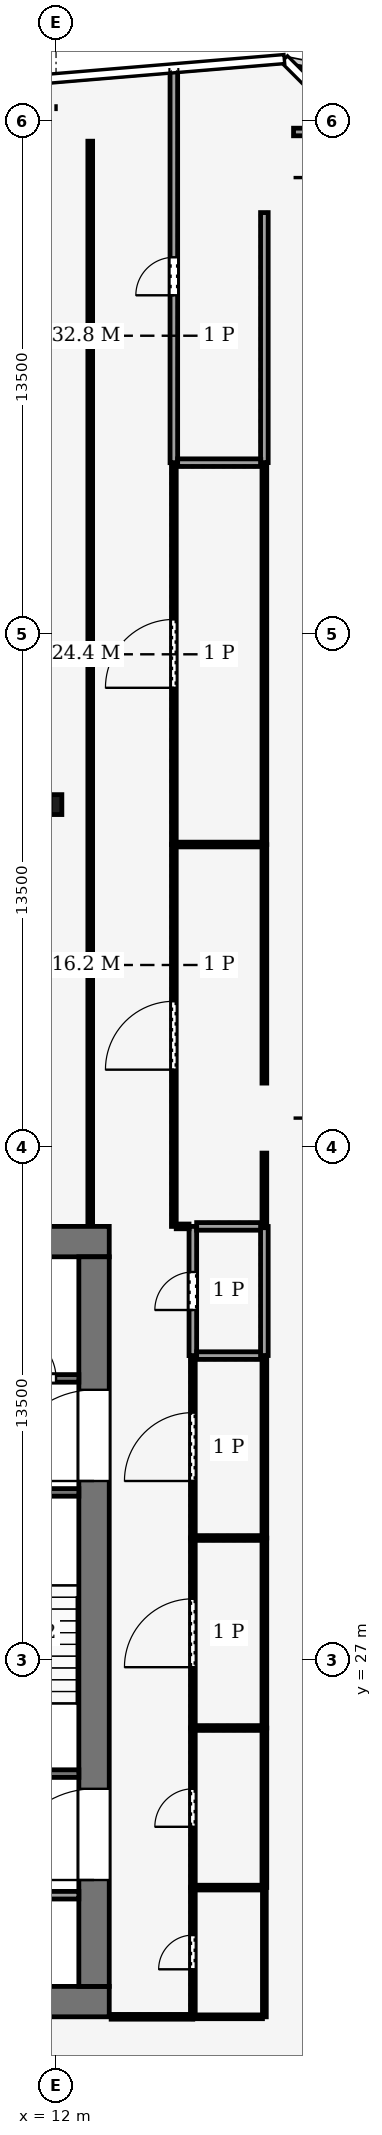
"""IFC4 building model, lengths in metres.
Left out: names, types, materials, properties, quantities, classifications, styles, units other than length and angle.
Written with IfcOpenShell. Run it as: python <this file> out.ifc"""

import sys

from ifc_helpers import new_model, si_unit, direction, frame, frame_2d, origin, origin_2d, place, context, subcontext, project, spatial, rectangle, hollow_rectangle, i_section, extrude, element, fill, save


model = new_model("IFC4")
c1 = context("Model", 3, precision=1e-05, world=origin(), true_north=direction((0.0, 1.0)))
c2 = subcontext(c1, "Body", "Model", "MODEL_VIEW")
j1 = project(units=[si_unit("LENGTHUNIT", "METRE"), si_unit("PLANEANGLEUNIT", "RADIAN")], contexts=[c1])
p1 = place(None, origin())
s1 = spatial("IfcSite", under=j1, at=p1, CompositionType="ELEMENT")
p2 = place(p1, origin())
s2 = spatial("IfcBuilding", under=s1, at=p2, CompositionType="ELEMENT")
p3 = place(p2, frame((0.0, 0.0, 282.0)))
s3 = spatial("IfcBuildingStorey", under=s2, at=p3, CompositionType="ELEMENT", Elevation=282.0)
for number, where, z_axis, x_axis in (
    (1, (-13.4, 18.0, -0.25), (0.0, 0.0, 1.0), (1.0, 0.0, 0.0)),
    (2, (-13.4, 38.0, -0.25), (0.0, 0.0, 1.0), (1.0, 0.0, 0.0)),
):
    element("IfcWall", number, at=place(p3, frame(where, z_axis=z_axis, x_axis=x_axis)), inside=s3, PredefinedType="SHEAR", context=c2, shape_type="SweptSolid", body=[
        extrude(rectangle(XDim=26.8, YDim=0.8, at=frame_2d((13.4, 0.0))), origin(), (0.0, 0.0, 1.0), 7.12),
    ])
p4 = place(p3, frame((13.0, 18.4, -0.25), z_axis=(0.0, 0.0, 1.0), x_axis=(0.0, 1.0, 0.0)))
e3 = element("IfcWall", 3, at=p4, inside=s3, PredefinedType="SHEAR", context=c2, shape_type="SweptSolid", body=[
    extrude(rectangle(XDim=19.2, YDim=0.8, at=frame_2d((9.6, 0.0))), origin(), (0.0, 0.0, 1.0), 7.12),
])
p5 = place(p4, frame((2.8, 0.0, 0.25)))
e4 = element("IfcOpeningElement", 4, at=p5, cuts=e3, PredefinedType="OPENING", context=c2, shape_type="SweptSolid", body=[
    extrude(rectangle(XDim=2.4, YDim=2.4, at=frame_2d((1.2, 1.2))), frame((0.0, 0.41, 0.0), z_axis=(0.0, -1.0, 0.0), x_axis=(1.0, 0.0, 0.0)), (0.0, 0.0, 1.0), 0.82),
])
p6 = place(p4, frame((13.3, 0.0, 0.25)))
e5 = element("IfcOpeningElement", 5, at=p6, cuts=e3, PredefinedType="OPENING", context=c2, shape_type="SweptSolid", body=[
    extrude(rectangle(XDim=2.4, YDim=2.4, at=frame_2d((1.2, 1.2))), frame((0.0, 0.41, 0.0), z_axis=(0.0, -1.0, 0.0), x_axis=(1.0, 0.0, 0.0)), (0.0, 0.0, 1.0), 0.82),
])
for number, where, z_axis, x_axis in (
    (6, (21.0, 66.0, 0.223), (-0.387, 0.0, 0.922), (0.0, -1.0, 0.0)),
    (7, (21.0, 41.25, 0.223), (-0.387, 0.0, 0.922), (0.0, -1.0, 0.0)),
):
    element("IfcColumn", number, at=place(p3, frame(where, z_axis=z_axis, x_axis=x_axis)), inside=s3, PredefinedType="COLUMN", context=c2, shape_type="SweptSolid", body=[
        extrude(hollow_rectangle(XDim=1.0, YDim=1.0, WallThickness=0.045, at=origin_2d()), origin(), (0.0, 0.0, 1.0), 7.108),
    ])
p7 = place(p3, frame((12.0, 67.75, 0.029), z_axis=(0.0, 0.025979412411, 0.999662478105), x_axis=(-1.0, 0.0, 0.0)))
e8 = element("IfcColumn", 8, at=p7, inside=s3, PredefinedType="COLUMN", context=c2, shape_type="SweptSolid", body=[
    extrude(hollow_rectangle(XDim=0.6, YDim=0.6, WallThickness=0.025, at=origin_2d()), origin(), (0.0, 0.0, 1.0), 6.945),
])
p8 = place(p3, frame((12.0, 49.5, 0.0), z_axis=(0.0, 0.0, 1.0), x_axis=(1.0, 0.0, 0.0)))
e9 = element("IfcColumn", 9, at=p8, inside=s3, PredefinedType="COLUMN", context=c2, shape_type="SweptSolid", body=[
    extrude(i_section(OverallWidth=0.306, OverallDepth=0.524, WebThickness=0.012, FlangeThickness=0.04, FilletRadius=0.027, at=origin_2d()), origin(), (0.0, 0.0, 1.0), 7.0),
])
p9 = place(p3, frame((6.0, 20.8, 0.0), z_axis=(0.0, 0.0, 1.0), x_axis=(1.0, 0.0, 0.0)))
e10 = element("IfcWall", 10, at=p9, inside=s3, PredefinedType="PARTITIONING", context=c2, shape_type="SweptSolid", body=[
    extrude(rectangle(XDim=6.6, YDim=0.2, at=frame_2d((3.3, 0.0))), origin(), (0.0, 0.0, 1.0), 6.87),
])
p10 = place(p9, frame((2.8, 0.0, 0.0)))
e11 = element("IfcOpeningElement", 11, at=p10, cuts=e10, PredefinedType="OPENING", context=c2, shape_type="SweptSolid", body=[
    extrude(rectangle(XDim=1.0, YDim=2.1, at=frame_2d((0.5, 1.05))), frame((0.0, 0.11, 0.0), z_axis=(0.0, -1.0, 0.0), x_axis=(1.0, 0.0, 0.0)), (0.0, 0.0, 1.0), 0.22),
])
p11 = place(p3, frame((6.0, 24.0, 0.0), z_axis=(0.0, 0.0, 1.0), x_axis=(1.0, 0.0, 0.0)))
e12 = element("IfcWall", 12, at=p11, inside=s3, PredefinedType="PARTITIONING", context=c2, shape_type="SweptSolid", body=[
    extrude(rectangle(XDim=6.6, YDim=0.2, at=frame_2d((3.3, 0.0))), origin(), (0.0, 0.0, 1.0), 6.87),
])
p12 = place(p11, frame((0.9, 0.0, 0.0)))
e13 = element("IfcOpeningElement", 13, at=p12, cuts=e12, PredefinedType="OPENING", context=c2, shape_type="SweptSolid", body=[
    extrude(rectangle(XDim=1.0, YDim=2.1, at=frame_2d((0.5, 1.05))), frame((0.0, 0.11, 0.0), z_axis=(0.0, -1.0, 0.0), x_axis=(1.0, 0.0, 0.0)), (0.0, 0.0, 1.0), 0.22),
])
p13 = place(p11, frame((4.4, 0.0, 0.0)))
e14 = element("IfcOpeningElement", 14, at=p13, cuts=e12, PredefinedType="OPENING", context=c2, shape_type="SweptSolid", body=[
    extrude(rectangle(XDim=1.2, YDim=2.2, at=frame_2d((0.6, 1.1))), frame((0.0, 0.11, 0.0), z_axis=(0.0, -1.0, 0.0), x_axis=(1.0, 0.0, 0.0)), (0.0, 0.0, 1.0), 0.22),
])
p14 = place(p3, frame((6.0, 31.4, 0.0), z_axis=(0.0, 0.0, 1.0), x_axis=(1.0, 0.0, 0.0)))
e15 = element("IfcWall", 15, at=p14, inside=s3, PredefinedType="PARTITIONING", context=c2, shape_type="SweptSolid", body=[
    extrude(rectangle(XDim=6.6, YDim=0.2, at=frame_2d((3.3, 0.0))), origin(), (0.0, 0.0, 1.0), 6.87),
])
p15 = place(p3, frame((6.0, 34.4, 0.0), z_axis=(0.0, 0.0, 1.0), x_axis=(1.0, 0.0, 0.0)))
e16 = element("IfcWall", 16, at=p15, inside=s3, PredefinedType="PARTITIONING", context=c2, shape_type="SweptSolid", body=[
    extrude(rectangle(XDim=6.6, YDim=0.2, at=frame_2d((3.3, 0.0))), origin(), (0.0, 0.0, 1.0), 6.87),
])
p16 = place(p15, frame((4.8, 0.0, 0.0)))
e17 = element("IfcOpeningElement", 17, at=p16, cuts=e16, PredefinedType="OPENING", context=c2, shape_type="SweptSolid", body=[
    extrude(rectangle(XDim=1.2, YDim=2.2, at=frame_2d((0.6, 1.1))), frame((0.0, 0.11, 0.0), z_axis=(0.0, -1.0, 0.0), x_axis=(1.0, 0.0, 0.0)), (0.0, 0.0, 1.0), 0.22),
])
p17 = place(p3, frame((15.6, 17.6, 0.0), z_axis=(0.0, 0.0, 1.0), x_axis=(0.0, 1.0, 0.0)))
e18 = element("IfcWall", 18, at=p17, inside=s3, PredefinedType="PARTITIONING", context=c2, shape_type="SweptSolid", body=[
    extrude(rectangle(XDim=3.4, YDim=0.125, at=frame_2d((1.7, 0.0))), origin(), (0.0, 0.0, 1.0), 6.14),
])
p18 = place(p17, frame((1.25, 0.0, 0.0)))
e19 = element("IfcOpeningElement", 19, at=p18, cuts=e18, PredefinedType="OPENING", context=c2, shape_type="SweptSolid", body=[
    extrude(rectangle(XDim=0.9, YDim=2.1, at=frame_2d((0.45, 1.05))), frame((0.0, 0.073, 0.0), z_axis=(0.0, -1.0, 0.0), x_axis=(1.0, 0.0, 0.0)), (0.0, 0.0, 1.0), 0.145),
])
p19 = place(p3, frame((15.6, 21.0, 0.0), z_axis=(0.0, 0.0, 1.0), x_axis=(0.0, 1.0, 0.0)))
e20 = element("IfcWall", 20, at=p19, inside=s3, PredefinedType="PARTITIONING", context=c2, shape_type="SweptSolid", body=[
    extrude(rectangle(XDim=4.2, YDim=0.125, at=frame_2d((2.1, 0.0))), origin(), (0.0, 0.0, 1.0), 6.48),
])
p20 = place(p19, frame((1.6, 0.0, 0.0)))
e21 = element("IfcOpeningElement", 21, at=p20, cuts=e20, PredefinedType="OPENING", context=c2, shape_type="SweptSolid", body=[
    extrude(rectangle(XDim=1.0, YDim=2.1, at=frame_2d((0.5, 1.05))), frame((0.0, 0.073, 0.0), z_axis=(0.0, -1.0, 0.0), x_axis=(1.0, 0.0, 0.0)), (0.0, 0.0, 1.0), 0.145),
])
p21 = place(p3, frame((15.6, 25.2, 0.0), z_axis=(0.0, 0.0, 1.0), x_axis=(0.0, 1.0, 0.0)))
e22 = element("IfcWall", 22, at=p21, inside=s3, PredefinedType="PARTITIONING", context=c2, shape_type="SweptSolid", body=[
    extrude(rectangle(XDim=5.0, YDim=0.125, at=frame_2d((2.5, 0.0))), origin(), (0.0, 0.0, 1.0), 6.48),
])
p22 = place(p21, frame((1.6, 0.0, 0.0)))
e23 = element("IfcOpeningElement", 23, at=p22, cuts=e22, PredefinedType="OPENING", context=c2, shape_type="SweptSolid", body=[
    extrude(rectangle(XDim=1.8, YDim=2.4, at=frame_2d((0.9, 1.2))), frame((0.0, 0.073, 0.0), z_axis=(0.0, -1.0, 0.0), x_axis=(1.0, 0.0, 0.0)), (0.0, 0.0, 1.0), 0.145),
])
p23 = place(p3, frame((15.6, 30.2, 0.0), z_axis=(0.0, 0.0, 1.0), x_axis=(0.0, 1.0, 0.0)))
e24 = element("IfcWall", 24, at=p23, inside=s3, PredefinedType="PARTITIONING", context=c2, shape_type="SweptSolid", body=[
    extrude(rectangle(XDim=4.8, YDim=0.125, at=frame_2d((2.4, 0.0))), origin(), (0.0, 0.0, 1.0), 6.48),
])
p24 = place(p23, frame((1.5, 0.0, 0.0)))
e25 = element("IfcOpeningElement", 25, at=p24, cuts=e24, PredefinedType="OPENING", context=c2, shape_type="SweptSolid", body=[
    extrude(rectangle(XDim=1.8, YDim=2.4, at=frame_2d((0.9, 1.2))), frame((0.0, 0.073, 0.0), z_axis=(0.0, -1.0, 0.0), x_axis=(1.0, 0.0, 0.0)), (0.0, 0.0, 1.0), 0.145),
])
p25 = place(p3, frame((15.6, 35.0, 0.0), z_axis=(0.0, 0.0, 1.0), x_axis=(0.0, 1.0, 0.0)))
e26 = element("IfcWall", 26, at=p25, inside=s3, PredefinedType="PARTITIONING", context=c2, shape_type="SweptSolid", body=[
    extrude(rectangle(XDim=3.4, YDim=0.2, at=frame_2d((1.7, 0.0))), origin(), (0.0, 0.0, 1.0), 6.14),
])
p26 = place(p25, frame((1.2, 0.0, 0.0)))
e27 = element("IfcOpeningElement", 27, at=p26, cuts=e26, PredefinedType="OPENING", context=c2, shape_type="SweptSolid", body=[
    extrude(rectangle(XDim=1.0, YDim=2.1, at=frame_2d((0.5, 1.05))), frame((0.0, 0.11, 0.0), z_axis=(0.0, -1.0, 0.0), x_axis=(1.0, 0.0, 0.0)), (0.0, 0.0, 1.0), 0.22),
])
p27 = place(p3, frame((15.1, 38.4, 0.0), z_axis=(0.0, 0.0, 1.0), x_axis=(0.0, 1.0, 0.0)))
e28 = element("IfcWall", 28, at=p27, inside=s3, PredefinedType="PARTITIONING", context=c2, shape_type="SweptSolid", body=[
    extrude(rectangle(XDim=10.049, YDim=0.125, at=frame_2d((5.024, 0.0))), origin(), (0.0, 0.0, 1.0), 6.14),
])
p28 = place(p27, frame((4.125, 0.0, 0.0)))
e29 = element("IfcOpeningElement", 29, at=p28, cuts=e28, PredefinedType="OPENING", context=c2, shape_type="SweptSolid", body=[
    extrude(rectangle(XDim=1.8, YDim=2.4, at=frame_2d((0.9, 1.2))), frame((0.0, 0.073, 0.0), z_axis=(0.0, -1.0, 0.0), x_axis=(1.0, 0.0, 0.0)), (0.0, 0.0, 1.0), 0.145),
])
p29 = place(p3, frame((15.163, 38.4, 0.0), z_axis=(0.0, 0.0, 1.0), x_axis=(1.0, 0.0, 0.0)))
e30 = element("IfcWall", 30, at=p29, inside=s3, PredefinedType="PARTITIONING", context=c2, shape_type="SweptSolid", body=[
    extrude(rectangle(XDim=0.337, YDim=0.125, at=frame_2d((0.169, 0.0))), origin(), (0.0, 0.0, 1.0), 6.14),
])
p30 = place(p3, frame((15.1, 48.449, 0.0), z_axis=(0.0, 0.0, 1.0), x_axis=(0.0, 1.0, 0.0)))
e31 = element("IfcWall", 31, at=p30, inside=s3, PredefinedType="PARTITIONING", context=c2, shape_type="SweptSolid", body=[
    extrude(rectangle(XDim=10.049, YDim=0.125, at=frame_2d((5.024, 0.0))), origin(), (0.0, 0.0, 1.0), 6.35),
])
p31 = place(p30, frame((4.125, 0.0, 0.0)))
e32 = element("IfcOpeningElement", 32, at=p31, cuts=e31, PredefinedType="OPENING", context=c2, shape_type="SweptSolid", body=[
    extrude(rectangle(XDim=1.8, YDim=2.4, at=frame_2d((0.9, 1.2))), frame((0.0, 0.073, 0.0), z_axis=(0.0, -1.0, 0.0), x_axis=(1.0, 0.0, 0.0)), (0.0, 0.0, 1.0), 0.145),
])
p32 = place(p3, frame((15.1, 58.498, 0.0), z_axis=(0.0, 0.0, 1.0), x_axis=(0.0, 1.0, 0.0)))
e33 = element("IfcWall", 33, at=p32, inside=s3, PredefinedType="PARTITIONING", context=c2, shape_type="SweptSolid", body=[
    extrude(rectangle(XDim=10.34, YDim=0.2, at=frame_2d((5.17, 0.0))), origin(), (0.0, 0.0, 1.0), 6.04),
])
p33 = place(p32, frame((4.405, 0.0, 0.0)))
e34 = element("IfcOpeningElement", 34, at=p33, cuts=e33, PredefinedType="OPENING", context=c2, shape_type="SweptSolid", body=[
    extrude(rectangle(XDim=1.0, YDim=2.1, at=frame_2d((0.5, 1.05))), frame((0.0, 0.11, 0.0), z_axis=(0.0, -1.0, 0.0), x_axis=(1.0, 0.0, 0.0)), (0.0, 0.0, 1.0), 0.22),
])
for number, where, z_axis, x_axis in (
    (35, (15.663, 21.0, 0.0), (0.0, 0.0, 1.0), (1.0, 0.0, 0.0)),
    (36, (15.663, 25.2, 0.0), (0.0, 0.0, 1.0), (1.0, 0.0, 0.0)),
    (37, (15.663, 30.2, 0.0), (0.0, 0.0, 1.0), (1.0, 0.0, 0.0)),
):
    element("IfcWall", number, at=place(p3, frame(where, z_axis=z_axis, x_axis=x_axis)), inside=s3, PredefinedType="PARTITIONING", context=c2, shape_type="SweptSolid", body=[
        extrude(rectangle(XDim=1.819, YDim=0.125, at=frame_2d((0.91, 0.0))), origin(), (0.0, 0.0, 1.0), 6.87),
    ])
p34 = place(p3, frame((15.7, 35.0, 0.0), z_axis=(0.0, 0.0, 1.0), x_axis=(1.0, 0.0, 0.0)))
e38 = element("IfcWall", 38, at=p34, inside=s3, PredefinedType="PARTITIONING", context=c2, shape_type="SweptSolid", body=[
    extrude(rectangle(XDim=1.782, YDim=0.2, at=frame_2d((0.891, 0.0))), origin(), (0.0, 0.0, 1.0), 6.87),
])
p35 = place(p3, frame((15.7, 38.4, 0.0), z_axis=(0.0, 0.0, 1.0), x_axis=(1.0, 0.0, 0.0)))
e39 = element("IfcWall", 39, at=p35, inside=s3, PredefinedType="PARTITIONING", context=c2, shape_type="SweptSolid", body=[
    extrude(rectangle(XDim=1.782, YDim=0.2, at=frame_2d((0.891, 0.0))), origin(), (0.0, 0.0, 1.0), 6.14),
])
p36 = place(p3, frame((15.163, 48.449, 0.0), z_axis=(0.0, 0.0, 1.0), x_axis=(1.0, 0.0, 0.0)))
e40 = element("IfcWall", 40, at=p36, inside=s3, PredefinedType="PARTITIONING", context=c2, shape_type="SweptSolid", body=[
    extrude(rectangle(XDim=2.319, YDim=0.125, at=frame_2d((1.16, 0.0))), origin(), (0.0, 0.0, 1.0), 6.39),
])
p37 = place(p3, frame((15.2, 58.498, 0.0), z_axis=(0.0, 0.0, 1.0), x_axis=(1.0, 0.0, 0.0)))
e41 = element("IfcWall", 41, at=p37, inside=s3, PredefinedType="PARTITIONING", context=c2, shape_type="SweptSolid", body=[
    extrude(rectangle(XDim=2.282, YDim=0.2, at=frame_2d((1.141, 0.0))), origin(), (0.0, 0.0, 1.0), 6.24),
])
p38 = place(p3, frame((12.9, 38.45, 0.0), z_axis=(0.0, 0.0, 1.0), x_axis=(0.0, 1.0, 0.0)))
e42 = element("IfcWall", 42, at=p38, inside=s3, PredefinedType="PARTITIONING", context=c2, shape_type="SweptSolid", body=[
    extrude(rectangle(XDim=28.508, YDim=0.125, at=frame_2d((14.254, 0.0))), origin(), (0.0, 0.0, 1.0), 6.35),
])
p39 = place(p3, frame((15.598, 17.6, 0.0), z_axis=(0.0, 0.0, 1.0), x_axis=(-1.0, 0.0, 0.0)))
e43 = element("IfcWall", 43, at=p39, inside=s3, PredefinedType="PARTITIONING", context=c2, shape_type="SweptSolid", body=[
    extrude(rectangle(XDim=2.148, YDim=0.125, at=frame_2d((1.074, 0.0))), origin(), (0.0, 0.0, 1.0), 6.14),
])
p40 = place(p3, frame((17.482, 20.998, 0.0), z_axis=(0.0, 0.0, 1.0), x_axis=(0.0, -1.0, 0.0)))
e44 = element("IfcWall", 44, at=p40, inside=s3, PredefinedType="PARTITIONING", context=c2, shape_type="SweptSolid", body=[
    extrude(rectangle(XDim=3.398, YDim=0.1, at=frame_2d((1.699, 0.0))), origin(), (0.0, 0.0, 1.0), 6.14),
])
p41 = place(p3, frame((17.432, 17.6, 0.0), z_axis=(0.0, 0.0, 1.0), x_axis=(-1.0, 0.0, 0.0)))
e45 = element("IfcWall", 45, at=p41, inside=s3, PredefinedType="PARTITIONING", context=c2, shape_type="SweptSolid", body=[
    extrude(rectangle(XDim=1.83, YDim=0.1, at=frame_2d((0.915, 0.0))), origin(), (0.0, 0.0, 1.0), 6.14),
])
p42 = place(p3, frame((17.482, 25.198, 0.0), z_axis=(0.0, 0.0, 1.0), x_axis=(0.0, -1.0, 0.0)))
e46 = element("IfcWall", 46, at=p42, inside=s3, PredefinedType="PARTITIONING", context=c2, shape_type="SweptSolid", body=[
    extrude(rectangle(XDim=4.196, YDim=0.125, at=frame_2d((2.098, 0.0))), origin(), (0.0, 0.0, 1.0), 6.48),
])
p43 = place(p3, frame((17.482, 30.198, 0.0), z_axis=(0.0, 0.0, 1.0), x_axis=(0.0, -1.0, 0.0)))
e47 = element("IfcWall", 47, at=p43, inside=s3, PredefinedType="PARTITIONING", context=c2, shape_type="SweptSolid", body=[
    extrude(rectangle(XDim=4.996, YDim=0.125, at=frame_2d((2.498, 0.0))), origin(), (0.0, 0.0, 1.0), 6.48),
])
p44 = place(p3, frame((17.482, 34.998, 0.0), z_axis=(0.0, 0.0, 1.0), x_axis=(0.0, -1.0, 0.0)))
e48 = element("IfcWall", 48, at=p44, inside=s3, PredefinedType="PARTITIONING", context=c2, shape_type="SweptSolid", body=[
    extrude(rectangle(XDim=4.796, YDim=0.125, at=frame_2d((2.398, 0.0))), origin(), (0.0, 0.0, 1.0), 6.48),
])
p45 = place(p3, frame((17.482, 38.398, 0.0), z_axis=(0.0, 0.0, 1.0), x_axis=(0.0, -1.0, 0.0)))
e49 = element("IfcWall", 49, at=p45, inside=s3, PredefinedType="PARTITIONING", context=c2, shape_type="SweptSolid", body=[
    extrude(rectangle(XDim=3.396, YDim=0.2, at=frame_2d((1.698, 0.0))), origin(), (0.0, 0.0, 1.0), 6.14),
])
p46 = place(p3, frame((17.482, 48.447, 0.0), z_axis=(0.0, 0.0, 1.0), x_axis=(0.0, -1.0, 0.0)))
e50 = element("IfcWall", 50, at=p46, inside=s3, PredefinedType="PARTITIONING", context=c2, shape_type="SweptSolid", body=[
    extrude(rectangle(XDim=6.276, YDim=0.125, at=frame_2d((3.138, 0.0))), origin(), (0.0, 0.0, 1.0), 6.87),
])
p47 = place(p3, frame((17.482, 40.329, 0.0), z_axis=(0.0, 0.0, 1.0), x_axis=(0.0, -1.0, 0.0)))
e51 = element("IfcWall", 51, at=p47, inside=s3, PredefinedType="PARTITIONING", context=c2, shape_type="SweptSolid", body=[
    extrude(rectangle(XDim=1.927, YDim=0.125, at=frame_2d((0.963, 0.0))), origin(), (0.0, 0.0, 1.0), 6.14),
])
p48 = place(p3, frame((17.482, 58.496, 0.0), z_axis=(0.0, 0.0, 1.0), x_axis=(0.0, -1.0, 0.0)))
e52 = element("IfcWall", 52, at=p48, inside=s3, PredefinedType="PARTITIONING", context=c2, shape_type="SweptSolid", body=[
    extrude(rectangle(XDim=10.045, YDim=0.125, at=frame_2d((5.022, 0.0))), origin(), (0.0, 0.0, 1.0), 6.35),
])
p49 = place(p3, frame((19.9, 67.2, 0.0), z_axis=(0.0, 0.0, 1.0), x_axis=(-1.0, 0.0, 0.0)))
e53 = element("IfcWall", 53, at=p49, inside=s3, PredefinedType="PARTITIONING", context=c2, shape_type="SweptSolid", body=[
    extrude(rectangle(XDim=1.65, YDim=0.2, at=frame_2d((0.825, 0.0))), origin(), (0.0, 0.0, 1.0), 6.87),
])
p50 = place(p3, frame((17.482, 65.079, 0.0), z_axis=(0.0, 0.0, 1.0), x_axis=(0.0, -1.0, 0.0)))
e54 = element("IfcWall", 54, at=p50, inside=s3, PredefinedType="PARTITIONING", context=c2, shape_type="SweptSolid", body=[
    extrude(rectangle(XDim=6.579, YDim=0.2, at=frame_2d((3.29, 0.0))), origin(), (0.0, 0.0, 1.0), 6.87),
])
p51 = place(p16, origin())
e55 = element("IfcDoor", 55, at=p51, inside=s3, OperationType="SINGLE_SWING_LEFT", PredefinedType="DOOR", context=c2, shape_type="SweptSolid", body=[
    extrude(rectangle(XDim=1.2, YDim=2.2, at=frame_2d((0.6, 1.1))), frame((0.0, 0.025, 0.0), z_axis=(0.0, -1.0, 0.0), x_axis=(1.0, 0.0, 0.0)), (0.0, 0.0, 1.0), 0.05),
])
fill(e17, e55)
p52 = place(p5, origin())
e56 = element("IfcDoor", 56, at=p52, inside=s3, OperationType="DOUBLE_DOOR_SINGLE_SWING", PredefinedType="DOOR", context=c2, shape_type="SweptSolid", body=[
    extrude(rectangle(XDim=2.4, YDim=2.4, at=frame_2d((1.2, 1.2))), frame((0.0, 0.025, 0.0), z_axis=(0.0, -1.0, 0.0), x_axis=(1.0, 0.0, 0.0)), (0.0, 0.0, 1.0), 0.05),
])
fill(e4, e56)
p53 = place(p6, origin())
e57 = element("IfcDoor", 57, at=p53, inside=s3, OperationType="DOUBLE_DOOR_SINGLE_SWING", PredefinedType="DOOR", context=c2, shape_type="SweptSolid", body=[
    extrude(rectangle(XDim=2.4, YDim=2.4, at=frame_2d((1.2, 1.2))), frame((0.0, 0.025, 0.0), z_axis=(0.0, -1.0, 0.0), x_axis=(1.0, 0.0, 0.0)), (0.0, 0.0, 1.0), 0.05),
])
fill(e5, e57)
p54 = place(p18, origin())
e58 = element("IfcDoor", 58, at=p54, inside=s3, OperationType="SINGLE_SWING_LEFT", PredefinedType="DOOR", context=c2, shape_type="SweptSolid", body=[
    extrude(rectangle(XDim=0.9, YDim=2.1, at=frame_2d((0.45, 1.05))), frame((0.0, 0.025, 0.0), z_axis=(0.0, -1.0, 0.0), x_axis=(1.0, 0.0, 0.0)), (0.0, 0.0, 1.0), 0.05),
])
fill(e19, e58)
p55 = place(p20, origin())
e59 = element("IfcDoor", 59, at=p55, inside=s3, OperationType="SINGLE_SWING_RIGHT", PredefinedType="DOOR", context=c2, shape_type="SweptSolid", body=[
    extrude(rectangle(XDim=1.0, YDim=2.1, at=frame_2d((0.5, 1.05))), frame((0.0, 0.025, 0.0), z_axis=(0.0, -1.0, 0.0), x_axis=(1.0, 0.0, 0.0)), (0.0, 0.0, 1.0), 0.05),
])
fill(e21, e59)
p56 = place(p22, origin())
e60 = element("IfcDoor", 60, at=p56, inside=s3, OperationType="DOUBLE_DOOR_SINGLE_SWING", PredefinedType="DOOR", context=c2, shape_type="SweptSolid", body=[
    extrude(rectangle(XDim=1.8, YDim=2.4, at=frame_2d((0.9, 1.2))), frame((0.0, 0.025, 0.0), z_axis=(0.0, -1.0, 0.0), x_axis=(1.0, 0.0, 0.0)), (0.0, 0.0, 1.0), 0.05),
])
fill(e23, e60)
p57 = place(p24, origin())
e61 = element("IfcDoor", 61, at=p57, inside=s3, OperationType="DOUBLE_DOOR_SINGLE_SWING", PredefinedType="DOOR", context=c2, shape_type="SweptSolid", body=[
    extrude(rectangle(XDim=1.8, YDim=2.4, at=frame_2d((0.9, 1.2))), frame((0.0, 0.025, 0.0), z_axis=(0.0, -1.0, 0.0), x_axis=(1.0, 0.0, 0.0)), (0.0, 0.0, 1.0), 0.05),
])
fill(e25, e61)
p58 = place(p26, origin())
e62 = element("IfcDoor", 62, at=p58, inside=s3, OperationType="SINGLE_SWING_LEFT", PredefinedType="DOOR", context=c2, shape_type="SweptSolid", body=[
    extrude(rectangle(XDim=1.0, YDim=2.1, at=frame_2d((0.5, 1.05))), frame((0.0, 0.025, 0.0), z_axis=(0.0, -1.0, 0.0), x_axis=(1.0, 0.0, 0.0)), (0.0, 0.0, 1.0), 0.05),
])
fill(e27, e62)
p59 = place(p28, origin())
e63 = element("IfcDoor", 63, at=p59, inside=s3, OperationType="DOUBLE_DOOR_SINGLE_SWING", PredefinedType="DOOR", context=c2, shape_type="SweptSolid", body=[
    extrude(rectangle(XDim=1.8, YDim=2.4, at=frame_2d((0.9, 1.2))), frame((0.0, 0.025, 0.0), z_axis=(0.0, -1.0, 0.0), x_axis=(1.0, 0.0, 0.0)), (0.0, 0.0, 1.0), 0.05),
])
fill(e29, e63)
p60 = place(p31, origin())
e64 = element("IfcDoor", 64, at=p60, inside=s3, OperationType="DOUBLE_DOOR_SINGLE_SWING", PredefinedType="DOOR", context=c2, shape_type="SweptSolid", body=[
    extrude(rectangle(XDim=1.8, YDim=2.4, at=frame_2d((0.9, 1.2))), frame((0.0, 0.025, 0.0), z_axis=(0.0, -1.0, 0.0), x_axis=(1.0, 0.0, 0.0)), (0.0, 0.0, 1.0), 0.05),
])
fill(e32, e64)
p61 = place(p33, origin())
e65 = element("IfcDoor", 65, at=p61, inside=s3, OperationType="SINGLE_SWING_LEFT", PredefinedType="DOOR", context=c2, shape_type="SweptSolid", body=[
    extrude(rectangle(XDim=1.0, YDim=2.1, at=frame_2d((0.5, 1.05))), frame((0.0, 0.025, 0.0), z_axis=(0.0, -1.0, 0.0), x_axis=(1.0, 0.0, 0.0)), (0.0, 0.0, 1.0), 0.05),
])
fill(e34, e65)
save(model, sys.argv[1])
